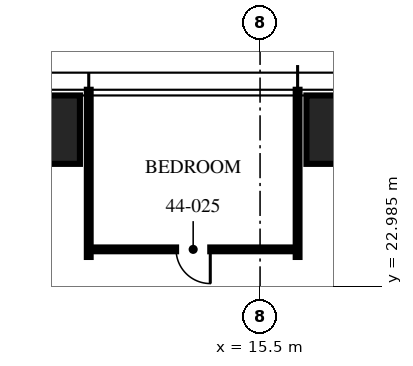
"""IFC4 building model, lengths in metres.
Left out: names, types, materials, properties, quantities, classifications, styles, units other than length and angle.
Written with IfcOpenShell. Run it as: python <this file> out.ifc"""

import sys

from ifc_helpers import new_model, si_unit, direction, frame, frame_2d, origin, origin_2d, place, context, subcontext, project, spatial, rectangle, hollow_rectangle, extrude, element, fill, save


model = new_model("IFC4")
c1 = context("Model", 3, precision=1e-05, world=origin(), true_north=direction((0.0, 1.0)))
c2 = subcontext(c1, "Body", "Model", "MODEL_VIEW")
j1 = project(units=[si_unit("LENGTHUNIT", "METRE"), si_unit("PLANEANGLEUNIT", "RADIAN")], contexts=[c1])
p1 = place(None, origin())
s1 = spatial("IfcSite", under=j1, at=p1, CompositionType="ELEMENT")
p2 = place(p1, origin())
s2 = spatial("IfcBuilding", under=s1, at=p2, CompositionType="ELEMENT")
p3 = place(p2, frame((0.0, 0.0, 174.75)))
s3 = spatial("IfcBuildingStorey", under=s2, at=p3, CompositionType="ELEMENT", Elevation=174.75)
for number, where, z_axis, x_axis in (
    (1, (9.16, 27.1, 0.0), (0.0, 0.0, 1.0), (1.0, 0.0, 0.0)),
    (2, (18.32, 27.1, 0.0), (0.0, 0.0, 1.0), (1.0, 0.0, 0.0)),
):
    element("IfcColumn", number, at=place(p3, frame(where, z_axis=z_axis, x_axis=x_axis)), inside=s3, PredefinedType="COLUMN", context=c2, shape_type="SweptSolid", body=[
        extrude(hollow_rectangle(XDim=3.2, YDim=1.8, WallThickness=0.2, at=origin_2d()), origin(), (0.0, 0.0, 1.0), 3.75),
    ])
for number, where, z_axis, x_axis in (
    (3, (16.488, 23.75, 0.0), (0.0, 0.0, 1.0), (0.0, 1.0, 0.0)),
    (4, (10.992, 23.75, 0.0), (0.0, 0.0, 1.0), (0.0, 1.0, 0.0)),
):
    element("IfcWall", number, at=place(p3, frame(where, z_axis=z_axis, x_axis=x_axis)), inside=s3, PredefinedType="PARTITIONING", context=c2, shape_type="SweptSolid", body=[
        extrude(rectangle(XDim=4.4, YDim=0.1, at=frame_2d((2.2, 0.0))), origin(), (0.0, 0.0, 1.0), 2.81),
    ])
p4 = place(p3, frame((16.488, 23.95, 0.0), z_axis=(0.0, 0.0, 1.0), x_axis=(-1.0, 0.0, 0.0)))
e5 = element("IfcWall", 5, at=p4, inside=s3, PredefinedType="PARTITIONING", context=c2, shape_type="SweptSolid", body=[
    extrude(rectangle(XDim=5.496, YDim=0.1, at=frame_2d((2.748, 0.0))), origin(), (0.0, 0.0, 1.0), 2.81),
])
p5 = place(p4, frame((2.298, 0.0, 0.0)))
e6 = element("IfcOpeningElement", 6, at=p5, cuts=e5, PredefinedType="OPENING", context=c2, shape_type="SweptSolid", body=[
    extrude(rectangle(XDim=0.9, YDim=2.1, at=frame_2d((0.45, 1.05))), frame((0.0, 0.06, 0.0), z_axis=(0.0, -1.0, 0.0), x_axis=(1.0, 0.0, 0.0)), (0.0, 0.0, 1.0), 0.12),
])
p6 = place(p5, origin())
e7 = element("IfcDoor", 7, at=p6, inside=s3, OperationType="SINGLE_SWING_LEFT", PredefinedType="DOOR", context=c2, shape_type="SweptSolid", body=[
    extrude(rectangle(XDim=0.9, YDim=2.1, at=frame_2d((0.45, 1.05))), frame((0.0, 0.025, 0.0), z_axis=(0.0, -1.0, 0.0), x_axis=(1.0, 0.0, 0.0)), (0.0, 0.0, 1.0), 0.05),
])
fill(e6, e7)
save(model, sys.argv[1])
